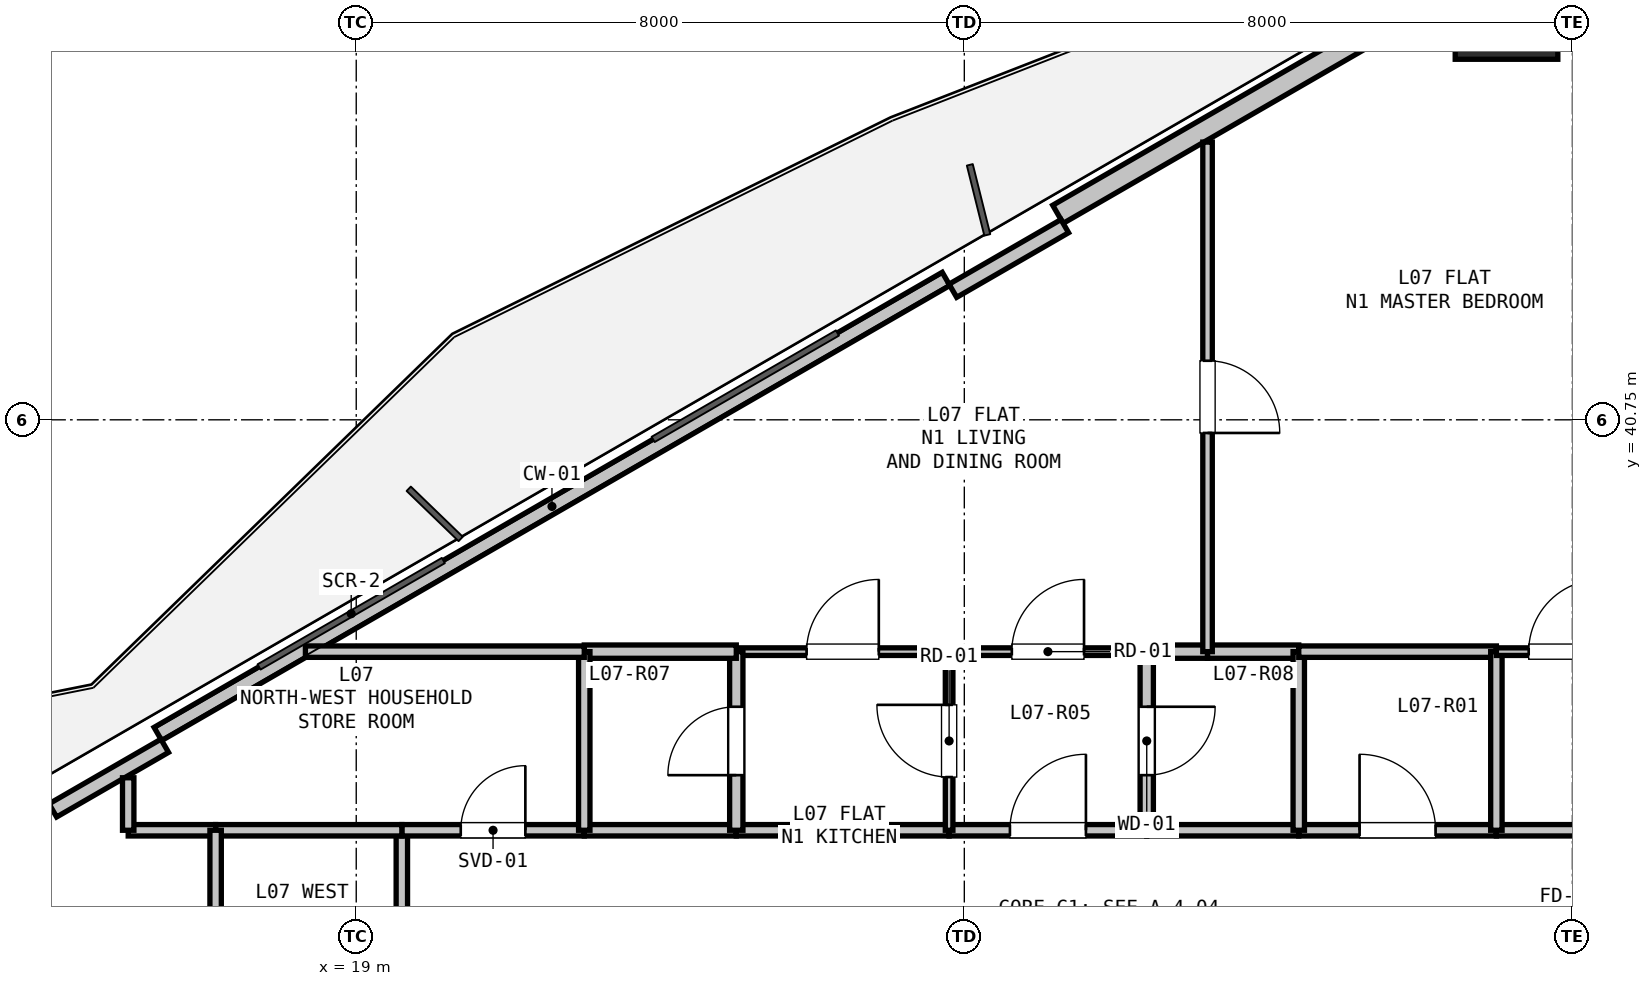
"""IFC4 building model, lengths in metres.
Left out: names, types, materials, properties, quantities, classifications, styles, units other than length and angle.
Written with IfcOpenShell. Run it as: python <this file> out.ifc"""

import sys

from ifc_helpers import new_model, si_unit, direction, frame, frame_2d, origin, origin_2d, place, context, subcontext, project, spatial, rectangle, hollow_rectangle, extrude, element, fill, save


model = new_model("IFC4")
c1 = context("Model", 3, precision=1e-05, world=origin(), true_north=direction((0.0, 1.0)))
c2 = subcontext(c1, "Body", "Model", "MODEL_VIEW")
j1 = project(units=[si_unit("LENGTHUNIT", "METRE"), si_unit("PLANEANGLEUNIT", "RADIAN")], contexts=[c1])
p1 = place(None, origin())
s1 = spatial("IfcSite", under=j1, at=p1, CompositionType="ELEMENT")
p2 = place(p1, origin())
s2 = spatial("IfcBuilding", under=s1, at=p2, CompositionType="ELEMENT")
p3 = place(p2, frame((0.0, 0.0, 29.1)))
s3 = spatial("IfcBuildingStorey", under=s2, at=p3, CompositionType="ELEMENT", Elevation=29.1)
p4 = place(p3, frame((34.133, 46.168, 0.0), z_axis=(0.0, 0.0, 1.0), x_axis=(1.0, 0.0, 0.0)))
e1 = element("IfcColumn", 1, at=p4, inside=s3, PredefinedType="COLUMN", context=c2, shape_type="SweptSolid", body=[
    extrude(hollow_rectangle(XDim=1.35, YDim=1.35, WallThickness=0.036, at=origin_2d()), origin(), (0.0, 0.0, 1.0), 3.3),
])
p5 = place(p3, frame((16.39, 36.617, 0.0), z_axis=(0.0, 0.0, 1.0), x_axis=(0.866027351828, 0.499996625875, 0.0)))
e2 = element("IfcWall", 2, at=p5, inside=s3, PredefinedType="PARAPET", context=c2, shape_type="SweptSolid", body=[
    extrude(rectangle(XDim=11.973, YDim=0.2, at=frame_2d((5.987, 0.0))), origin(), (0.0, 0.0, 1.0), 0.2),
])
p6 = place(p3, frame((28.232, 43.454, 0.0), z_axis=(0.0, 0.0, 1.0), x_axis=(0.86603192154, 0.499988710747, 0.0)))
e3 = element("IfcWall", 3, at=p6, inside=s3, PredefinedType="SOLIDWALL", context=c2, shape_type="SweptSolid", body=[
    extrude(rectangle(XDim=12.673, YDim=0.275, at=frame_2d((6.336, 0.0))), origin(), (0.0, 0.0, 1.0), 2.66),
])
p7 = place(p6, frame((4.68, 0.0, 0.9)))
e4 = element("IfcOpeningElement", 4, at=p7, cuts=e3, PredefinedType="OPENING", context=c2, shape_type="SweptSolid", body=[
    extrude(rectangle(XDim=1.2, YDim=1.4, at=frame_2d((0.6, 0.7))), frame((0.0, 0.147, 0.0), z_axis=(0.0, -1.0, 0.0), x_axis=(1.0, 0.0, 0.0)), (0.0, 0.0, 1.0), 0.295),
])
for number, where, z_axis, x_axis in (
    (5, (15.008, 35.611, 0.0), (0.0, 0.0, 1.0), (0.866, 0.5, 0.0)),
    (6, (26.85, 42.448, 0.0), (0.0, 0.0, 1.0), (0.866, 0.5, 0.0)),
):
    element("IfcWall", number, at=place(p3, frame(where, z_axis=z_axis, x_axis=x_axis)), inside=s3, PredefinedType="PARAPET", context=c2, shape_type="SweptSolid", body=[
        extrude(rectangle(XDim=1.7, YDim=0.2, at=frame_2d((0.85, 0.0))), origin(), (0.0, 0.0, 1.0), 2.66),
    ])
p8 = place(p3, frame((19.6, 29.75, 0.0), z_axis=(0.0, 0.0, 1.0), x_axis=(0.0, 1.0, 0.0)))
e7 = element("IfcWall", 7, at=p8, inside=s3, PredefinedType="PARTITIONING", context=c2, shape_type="SweptSolid", body=[
    extrude(rectangle(XDim=5.6, YDim=0.15, at=frame_2d((2.8, 0.0))), origin(), (0.0, 0.0, 1.0), 2.337),
])
p9 = place(p8, frame((2.3, 0.0, 0.0)))
e8 = element("IfcOpeningElement", 8, at=p9, cuts=e7, PredefinedType="OPENING", context=c2, shape_type="SweptSolid", body=[
    extrude(rectangle(XDim=1.0, YDim=2.15, at=frame_2d((0.5, 1.075))), frame((0.0, 0.085, 0.0), z_axis=(0.0, -1.0, 0.0), x_axis=(1.0, 0.0, 0.0)), (0.0, 0.0, 1.0), 0.17),
])
p10 = place(p3, frame((19.6, 35.35, 0.0), z_axis=(0.0, 0.0, 1.0), x_axis=(1.0, 0.0, 0.0)))
e9 = element("IfcWall", 9, at=p10, inside=s3, PredefinedType="PARTITIONING", context=c2, shape_type="SweptSolid", body=[
    extrude(rectangle(XDim=2.4, YDim=0.15, at=frame_2d((1.2, 0.0))), origin(), (0.0, 0.0, 1.0), 3.04),
])
p11 = place(p10, frame((0.775, 0.0, 0.0)))
e10 = element("IfcOpeningElement", 10, at=p11, cuts=e9, PredefinedType="OPENING", context=c2, shape_type="SweptSolid", body=[
    extrude(rectangle(XDim=0.85, YDim=2.1, at=frame_2d((0.425, 1.05))), frame((0.0, 0.085, 0.0), z_axis=(0.0, -1.0, 0.0), x_axis=(1.0, 0.0, 0.0)), (0.0, 0.0, 1.0), 0.17),
])
p12 = place(p3, frame((22.0, 35.35, 0.0), z_axis=(0.0, 0.0, 1.0), x_axis=(1.0, 0.0, 0.0)))
e11 = element("IfcWall", 11, at=p12, inside=s3, PredefinedType="PARTITIONING", context=c2, shape_type="SweptSolid", body=[
    extrude(rectangle(XDim=2.0, YDim=0.15, at=frame_2d((1.0, 0.0))), origin(), (0.0, 0.0, 1.0), 3.04),
])
p13 = place(p3, frame((24.0, 35.35, 0.0), z_axis=(0.0, 0.0, 1.0), x_axis=(1.0, 0.0, 0.0)))
e12 = element("IfcWall", 12, at=p13, inside=s3, PredefinedType="PARTITIONING", context=c2, shape_type="SweptSolid", body=[
    extrude(rectangle(XDim=2.8, YDim=0.15, at=frame_2d((1.4, 0.0))), origin(), (0.0, 0.0, 1.0), 3.04),
])
p14 = place(p3, frame((26.8, 35.35, 0.0), z_axis=(0.0, 0.0, 1.0), x_axis=(1.0, 0.0, 0.0)))
e13 = element("IfcWall", 13, at=p14, inside=s3, PredefinedType="PARTITIONING", context=c2, shape_type="SweptSolid", body=[
    extrude(rectangle(XDim=2.6, YDim=0.15, at=frame_2d((1.3, 0.0))), origin(), (0.0, 0.0, 1.0), 3.04),
])
p15 = place(p14, frame((0.8, 0.0, 0.0)))
e14 = element("IfcOpeningElement", 14, at=p15, cuts=e13, PredefinedType="OPENING", context=c2, shape_type="SweptSolid", body=[
    extrude(rectangle(XDim=1.0, YDim=2.15, at=frame_2d((0.5, 1.075))), frame((0.0, 0.085, 0.0), z_axis=(0.0, -1.0, 0.0), x_axis=(1.0, 0.0, 0.0)), (0.0, 0.0, 1.0), 0.17),
])
p16 = place(p3, frame((29.4, 35.35, 0.0), z_axis=(0.0, 0.0, 1.0), x_axis=(1.0, 0.0, 0.0)))
e15 = element("IfcWall", 15, at=p16, inside=s3, PredefinedType="PARTITIONING", context=c2, shape_type="SweptSolid", body=[
    extrude(rectangle(XDim=2.0, YDim=0.15, at=frame_2d((1.0, 0.0))), origin(), (0.0, 0.0, 1.0), 3.04),
])
p17 = place(p3, frame((31.4, 35.35, 0.0), z_axis=(0.0, 0.0, 1.0), x_axis=(1.0, 0.0, 0.0)))
e16 = element("IfcWall", 16, at=p17, inside=s3, PredefinedType="PARTITIONING", context=c2, shape_type="SweptSolid", body=[
    extrude(rectangle(XDim=2.6, YDim=0.15, at=frame_2d((1.3, 0.0))), origin(), (0.0, 0.0, 1.0), 3.04),
])
p18 = place(p17, frame((0.8, 0.0, 0.0)))
e17 = element("IfcOpeningElement", 17, at=p18, cuts=e16, PredefinedType="OPENING", context=c2, shape_type="SweptSolid", body=[
    extrude(rectangle(XDim=1.0, YDim=2.15, at=frame_2d((0.5, 1.075))), frame((0.0, 0.085, 0.0), z_axis=(0.0, -1.0, 0.0), x_axis=(1.0, 0.0, 0.0)), (0.0, 0.0, 1.0), 0.17),
])
p19 = place(p3, frame((34.0, 35.35, 0.0), z_axis=(0.0, 0.0, 1.0), x_axis=(1.0, 0.0, 0.0)))
e18 = element("IfcWall", 18, at=p19, inside=s3, PredefinedType="PARTITIONING", context=c2, shape_type="SweptSolid", body=[
    extrude(rectangle(XDim=1.8, YDim=0.15, at=frame_2d((0.9, 0.0))), origin(), (0.0, 0.0, 1.0), 3.04),
])
p20 = place(p3, frame((26.8, 37.7, 0.0), z_axis=(0.0, 0.0, 1.0), x_axis=(1.0, 0.0, 0.0)))
e19 = element("IfcWall", 19, at=p20, inside=s3, PredefinedType="PARTITIONING", context=c2, shape_type="SweptSolid", body=[
    extrude(rectangle(XDim=2.6, YDim=0.1, at=frame_2d((1.3, 0.0))), origin(), (0.0, 0.0, 1.0), 3.04),
])
p21 = place(p20, frame((0.825, 0.0, 0.0)))
e20 = element("IfcOpeningElement", 20, at=p21, cuts=e19, PredefinedType="OPENING", context=c2, shape_type="SweptSolid", body=[
    extrude(rectangle(XDim=0.95, YDim=2.1, at=frame_2d((0.475, 1.05))), frame((0.0, 0.06, 0.0), z_axis=(0.0, -1.0, 0.0), x_axis=(1.0, 0.0, 0.0)), (0.0, 0.0, 1.0), 0.12),
])
p22 = place(p3, frame((29.4, 37.7, 0.0), z_axis=(0.0, 0.0, 1.0), x_axis=(0.0, -1.0, 0.0)))
e21 = element("IfcWall", 21, at=p22, inside=s3, PredefinedType="PLUMBINGWALL", context=c2, shape_type="SweptSolid", body=[
    extrude(rectangle(XDim=2.35, YDim=0.175, at=frame_2d((1.175, 0.0))), origin(), (0.0, 0.0, 1.0), 3.04),
])
p23 = place(p22, frame((0.725, 0.0, 0.0)))
e22 = element("IfcOpeningElement", 22, at=p23, cuts=e21, PredefinedType="OPENING", context=c2, shape_type="SweptSolid", body=[
    extrude(rectangle(XDim=0.9, YDim=2.1, at=frame_2d((0.45, 1.05))), frame((0.0, 0.097, 0.0), z_axis=(0.0, -1.0, 0.0), x_axis=(1.0, 0.0, 0.0)), (0.0, 0.0, 1.0), 0.195),
])
p24 = place(p3, frame((26.8, 35.35, 0.0), z_axis=(0.0, 0.0, 1.0), x_axis=(0.0, 1.0, 0.0)))
e23 = element("IfcWall", 23, at=p24, inside=s3, PredefinedType="PARTITIONING", context=c2, shape_type="SweptSolid", body=[
    extrude(rectangle(XDim=2.35, YDim=0.1, at=frame_2d((1.175, 0.0))), origin(), (0.0, 0.0, 1.0), 3.04),
])
p25 = place(p24, frame((0.7, 0.0, 0.0)))
e24 = element("IfcOpeningElement", 24, at=p25, cuts=e23, PredefinedType="OPENING", context=c2, shape_type="SweptSolid", body=[
    extrude(rectangle(XDim=0.95, YDim=2.1, at=frame_2d((0.475, 1.05))), frame((0.0, 0.06, 0.0), z_axis=(0.0, -1.0, 0.0), x_axis=(1.0, 0.0, 0.0)), (0.0, 0.0, 1.0), 0.12),
])
p26 = place(p3, frame((24.0, 37.7, 0.0), z_axis=(0.0, 0.0, 1.0), x_axis=(1.0, 0.0, 0.0)))
e25 = element("IfcWall", 25, at=p26, inside=s3, PredefinedType="PARTITIONING", context=c2, shape_type="SweptSolid", body=[
    extrude(rectangle(XDim=2.8, YDim=0.1, at=frame_2d((1.4, 0.0))), origin(), (0.0, 0.0, 1.0), 3.04),
])
p27 = place(p26, frame((0.925, 0.0, 0.0)))
e26 = element("IfcOpeningElement", 26, at=p27, cuts=e25, PredefinedType="OPENING", context=c2, shape_type="SweptSolid", body=[
    extrude(rectangle(XDim=0.95, YDim=2.1, at=frame_2d((0.475, 1.05))), frame((0.0, 0.06, 0.0), z_axis=(0.0, -1.0, 0.0), x_axis=(1.0, 0.0, 0.0)), (0.0, 0.0, 1.0), 0.12),
])
p28 = place(p3, frame((24.0, 35.35, 0.0), z_axis=(0.0, 0.0, 1.0), x_axis=(0.0, 1.0, 0.0)))
e27 = element("IfcWall", 27, at=p28, inside=s3, PredefinedType="PLUMBINGWALL", context=c2, shape_type="SweptSolid", body=[
    extrude(rectangle(XDim=2.35, YDim=0.175, at=frame_2d((1.175, 0.0))), origin(), (0.0, 0.0, 1.0), 3.04),
])
p29 = place(p28, frame((0.725, 0.0, 0.0)))
e28 = element("IfcOpeningElement", 28, at=p29, cuts=e27, PredefinedType="OPENING", context=c2, shape_type="SweptSolid", body=[
    extrude(rectangle(XDim=0.9, YDim=2.1, at=frame_2d((0.45, 1.05))), frame((0.0, 0.097, 0.0), z_axis=(0.0, -1.0, 0.0), x_axis=(1.0, 0.0, 0.0)), (0.0, 0.0, 1.0), 0.195),
])
p30 = place(p3, frame((22.0, 37.7, 0.0), z_axis=(0.0, 0.0, 1.0), x_axis=(1.0, 0.0, 0.0)))
e29 = element("IfcWall", 29, at=p30, inside=s3, PredefinedType="PLUMBINGWALL", context=c2, shape_type="SweptSolid", body=[
    extrude(rectangle(XDim=2.0, YDim=0.175, at=frame_2d((1.0, 0.0))), origin(), (0.0, 0.0, 1.0), 3.04),
])
p31 = place(p3, frame((22.0, 35.35, 0.0), z_axis=(0.0, 0.0, 1.0), x_axis=(0.0, 1.0, 0.0)))
e30 = element("IfcWall", 30, at=p31, inside=s3, PredefinedType="PARTITIONING", context=c2, shape_type="SweptSolid", body=[
    extrude(rectangle(XDim=2.35, YDim=0.15, at=frame_2d((1.175, 0.0))), origin(), (0.0, 0.0, 1.0), 3.04),
])
p32 = place(p3, frame((29.4, 37.7, 0.0), z_axis=(0.0, 0.0, 1.0), x_axis=(1.0, 0.0, 0.0)))
e31 = element("IfcWall", 31, at=p32, inside=s3, PredefinedType="PLUMBINGWALL", context=c2, shape_type="SweptSolid", body=[
    extrude(rectangle(XDim=0.8, YDim=0.175, at=frame_2d((0.4, 0.0))), origin(), (0.0, 0.0, 1.0), 3.04),
])
p33 = place(p3, frame((30.2, 37.7, 0.0), z_axis=(0.0, 0.0, 1.0), x_axis=(1.0, 0.0, 0.0)))
e32 = element("IfcWall", 32, at=p33, inside=s3, PredefinedType="PLUMBINGWALL", context=c2, shape_type="SweptSolid", body=[
    extrude(rectangle(XDim=1.2, YDim=0.175, at=frame_2d((0.6, 0.0))), origin(), (0.0, 0.0, 1.0), 3.04),
])
p34 = place(p3, frame((31.4, 37.7, 0.0), z_axis=(0.0, 0.0, 1.0), x_axis=(0.0, -1.0, 0.0)))
e33 = element("IfcWall", 33, at=p34, inside=s3, PredefinedType="PARTITIONING", context=c2, shape_type="SweptSolid", body=[
    extrude(rectangle(XDim=2.35, YDim=0.15, at=frame_2d((1.175, 0.0))), origin(), (0.0, 0.0, 1.0), 3.04),
])
p35 = place(p3, frame((31.4, 37.7, 0.0), z_axis=(0.0, 0.0, 1.0), x_axis=(1.0, 0.0, 0.0)))
e34 = element("IfcWall", 34, at=p35, inside=s3, PredefinedType="PARTITIONING", context=c2, shape_type="SweptSolid", body=[
    extrude(rectangle(XDim=2.6, YDim=0.15, at=frame_2d((1.3, 0.0))), origin(), (0.0, 0.0, 1.0), 3.04),
])
p36 = place(p3, frame((34.0, 37.7, 0.0), z_axis=(0.0, 0.0, 1.0), x_axis=(0.0, -1.0, 0.0)))
e35 = element("IfcWall", 35, at=p36, inside=s3, PredefinedType="PARTITIONING", context=c2, shape_type="SweptSolid", body=[
    extrude(rectangle(XDim=2.35, YDim=0.15, at=frame_2d((1.175, 0.0))), origin(), (0.0, 0.0, 1.0), 3.04),
])
p37 = place(p3, frame((19.6, 35.35, 0.0), z_axis=(0.0, 0.0, 1.0), x_axis=(-1.0, 0.0, 0.0)))
e36 = element("IfcWall", 36, at=p37, inside=s3, PredefinedType="PARTITIONING", context=c2, shape_type="SweptSolid", body=[
    extrude(rectangle(XDim=2.45, YDim=0.15, at=frame_2d((1.225, 0.0))), origin(), (0.0, 0.0, 1.0), 3.04),
])
p38 = place(p3, frame((17.15, 35.35, 0.0), z_axis=(0.0, 0.0, 1.0), x_axis=(-1.0, 0.0, 0.0)))
e37 = element("IfcWall", 37, at=p38, inside=s3, PredefinedType="PARTITIONING", context=c2, shape_type="SweptSolid", body=[
    extrude(rectangle(XDim=1.15, YDim=0.15, at=frame_2d((0.575, 0.0))), origin(), (0.0, 0.0, 1.0), 3.04),
])
p39 = place(p3, frame((16.0, 35.35, 0.0), z_axis=(0.0, 0.0, 1.0), x_axis=(0.0, 1.0, 0.0)))
e38 = element("IfcWall", 38, at=p39, inside=s3, PredefinedType="PARTITIONING", context=c2, shape_type="SweptSolid", body=[
    extrude(rectangle(XDim=0.691, YDim=0.15, at=frame_2d((0.345, 0.0))), origin(), (0.0, 0.0, 1.0), 2.365),
])
p40 = place(p3, frame((18.331, 37.7, 0.0), z_axis=(0.0, 0.0, 1.0), x_axis=(1.0, 0.0, 0.0)))
e39 = element("IfcWall", 39, at=p40, inside=s3, PredefinedType="PARTITIONING", context=c2, shape_type="SweptSolid", body=[
    extrude(rectangle(XDim=3.669, YDim=0.15, at=frame_2d((1.834, 0.0))), origin(), (0.0, 0.0, 1.0), 2.365),
])
p41 = place(p3, frame((17.15, 29.75, 0.0), z_axis=(0.0, 0.0, 1.0), x_axis=(0.0, 1.0, 0.0)))
e40 = element("IfcWall", 40, at=p41, inside=s3, PredefinedType="PARTITIONING", context=c2, shape_type="SweptSolid", body=[
    extrude(rectangle(XDim=5.6, YDim=0.15, at=frame_2d((2.8, 0.0))), origin(), (0.0, 0.0, 1.0), 2.337),
])
p42 = place(p3, frame((34.0, 37.7, 0.0), z_axis=(0.0, 0.0, 1.0), x_axis=(1.0, 0.0, 0.0)))
e41 = element("IfcWall", 41, at=p42, inside=s3, PredefinedType="PARTITIONING", context=c2, shape_type="SweptSolid", body=[
    extrude(rectangle(XDim=1.8, YDim=0.1, at=frame_2d((0.9, 0.0))), origin(), (0.0, 0.0, 1.0), 3.04),
])
p43 = place(p42, frame((0.425, 0.0, 0.0)))
e42 = element("IfcOpeningElement", 42, at=p43, cuts=e41, PredefinedType="OPENING", context=c2, shape_type="SweptSolid", body=[
    extrude(rectangle(XDim=0.95, YDim=2.1, at=frame_2d((0.475, 1.05))), frame((0.0, 0.06, 0.0), z_axis=(0.0, -1.0, 0.0), x_axis=(1.0, 0.0, 0.0)), (0.0, 0.0, 1.0), 0.12),
])
p44 = place(p3, frame((30.2, 44.404, 0.0), z_axis=(0.0, 0.0, 1.0), x_axis=(0.0, -1.0, 0.0)))
e43 = element("IfcWall", 43, at=p44, inside=s3, PredefinedType="PARTITIONING", context=c2, shape_type="SweptSolid", body=[
    extrude(rectangle(XDim=6.704, YDim=0.125, at=frame_2d((3.352, 0.0))), origin(), (0.0, 0.0, 1.0), 2.365),
])
p45 = place(p44, frame((2.877, 0.0, 0.0)))
e44 = element("IfcOpeningElement", 44, at=p45, cuts=e43, PredefinedType="OPENING", context=c2, shape_type="SweptSolid", body=[
    extrude(rectangle(XDim=0.95, YDim=2.1, at=frame_2d((0.475, 1.05))), frame((0.0, 0.073, 0.0), z_axis=(0.0, -1.0, 0.0), x_axis=(1.0, 0.0, 0.0)), (0.0, 0.0, 1.0), 0.145),
])
p46 = place(p15, origin())
e45 = element("IfcDoor", 45, at=p46, inside=s3, OperationType="SINGLE_SWING_RIGHT", PredefinedType="DOOR", context=c2, shape_type="SweptSolid", body=[
    extrude(rectangle(XDim=1.0, YDim=2.15, at=frame_2d((0.5, 1.075))), frame((0.0, 0.025, 0.0), z_axis=(0.0, -1.0, 0.0), x_axis=(1.0, 0.0, 0.0)), (0.0, 0.0, 1.0), 0.05),
])
fill(e14, e45)
p47 = place(p18, origin())
e46 = element("IfcDoor", 46, at=p47, inside=s3, OperationType="SINGLE_SWING_LEFT", PredefinedType="DOOR", context=c2, shape_type="SweptSolid", body=[
    extrude(rectangle(XDim=1.0, YDim=2.15, at=frame_2d((0.5, 1.075))), frame((0.0, 0.025, 0.0), z_axis=(0.0, -1.0, 0.0), x_axis=(1.0, 0.0, 0.0)), (0.0, 0.0, 1.0), 0.05),
])
fill(e17, e46)
p48 = place(p11, origin())
e47 = element("IfcDoor", 47, at=p48, inside=s3, OperationType="SINGLE_SWING_RIGHT", PredefinedType="DOOR", context=c2, shape_type="SweptSolid", body=[
    extrude(rectangle(XDim=0.85, YDim=2.1, at=frame_2d((0.425, 1.05))), frame((0.0, 0.025, 0.0), z_axis=(0.0, -1.0, 0.0), x_axis=(1.0, 0.0, 0.0)), (0.0, 0.0, 1.0), 0.05),
])
fill(e10, e47)
p49 = place(p25, origin())
e48 = element("IfcDoor", 48, at=p49, inside=s3, OperationType="SINGLE_SWING_RIGHT", PredefinedType="DOOR", context=c2, shape_type="SweptSolid", body=[
    extrude(rectangle(XDim=0.95, YDim=2.1, at=frame_2d((0.475, 1.05))), frame((0.0, 0.025, 0.0), z_axis=(0.0, -1.0, 0.0), x_axis=(1.0, 0.0, 0.0)), (0.0, 0.0, 1.0), 0.05),
])
fill(e24, e48)
p50 = place(p23, origin())
e49 = element("IfcDoor", 49, at=p50, inside=s3, OperationType="SINGLE_SWING_LEFT", PredefinedType="DOOR", context=c2, shape_type="SweptSolid", body=[
    extrude(rectangle(XDim=0.9, YDim=2.1, at=frame_2d((0.45, 1.05))), frame((0.0, 0.025, 0.0), z_axis=(0.0, -1.0, 0.0), x_axis=(1.0, 0.0, 0.0)), (0.0, 0.0, 1.0), 0.05),
])
fill(e22, e49)
p51 = place(p21, origin())
e50 = element("IfcDoor", 50, at=p51, inside=s3, OperationType="SINGLE_SWING_RIGHT", PredefinedType="DOOR", context=c2, shape_type="SweptSolid", body=[
    extrude(rectangle(XDim=0.95, YDim=2.1, at=frame_2d((0.475, 1.05))), frame((0.0, 0.025, 0.0), z_axis=(0.0, -1.0, 0.0), x_axis=(1.0, 0.0, 0.0)), (0.0, 0.0, 1.0), 0.05),
])
fill(e20, e50)
p52 = place(p27, origin())
e51 = element("IfcDoor", 51, at=p52, inside=s3, OperationType="SINGLE_SWING_RIGHT", PredefinedType="DOOR", context=c2, shape_type="SweptSolid", body=[
    extrude(rectangle(XDim=0.95, YDim=2.1, at=frame_2d((0.475, 1.05))), frame((0.0, 0.025, 0.0), z_axis=(0.0, -1.0, 0.0), x_axis=(1.0, 0.0, 0.0)), (0.0, 0.0, 1.0), 0.05),
])
fill(e26, e51)
p53 = place(p43, origin())
e52 = element("IfcDoor", 52, at=p53, inside=s3, OperationType="SINGLE_SWING_RIGHT", PredefinedType="DOOR", context=c2, shape_type="SweptSolid", body=[
    extrude(rectangle(XDim=0.95, YDim=2.1, at=frame_2d((0.475, 1.05))), frame((0.0, 0.025, 0.0), z_axis=(0.0, -1.0, 0.0), x_axis=(1.0, 0.0, 0.0)), (0.0, 0.0, 1.0), 0.05),
])
fill(e42, e52)
p54 = place(p45, origin())
e53 = element("IfcDoor", 53, at=p54, inside=s3, OperationType="SINGLE_SWING_RIGHT", PredefinedType="DOOR", context=c2, shape_type="SweptSolid", body=[
    extrude(rectangle(XDim=0.95, YDim=2.1, at=frame_2d((0.475, 1.05))), frame((0.0, 0.025, 0.0), z_axis=(0.0, -1.0, 0.0), x_axis=(1.0, 0.0, 0.0)), (0.0, 0.0, 1.0), 0.05),
])
fill(e44, e53)
p55 = place(p29, origin())
e54 = element("IfcDoor", 54, at=p55, inside=s3, OperationType="SINGLE_SWING_LEFT", PredefinedType="DOOR", context=c2, shape_type="SweptSolid", body=[
    extrude(rectangle(XDim=0.9, YDim=2.1, at=frame_2d((0.45, 1.05))), frame((0.0, 0.025, 0.0), z_axis=(0.0, -1.0, 0.0), x_axis=(1.0, 0.0, 0.0)), (0.0, 0.0, 1.0), 0.05),
])
fill(e28, e54)
save(model, sys.argv[1])
